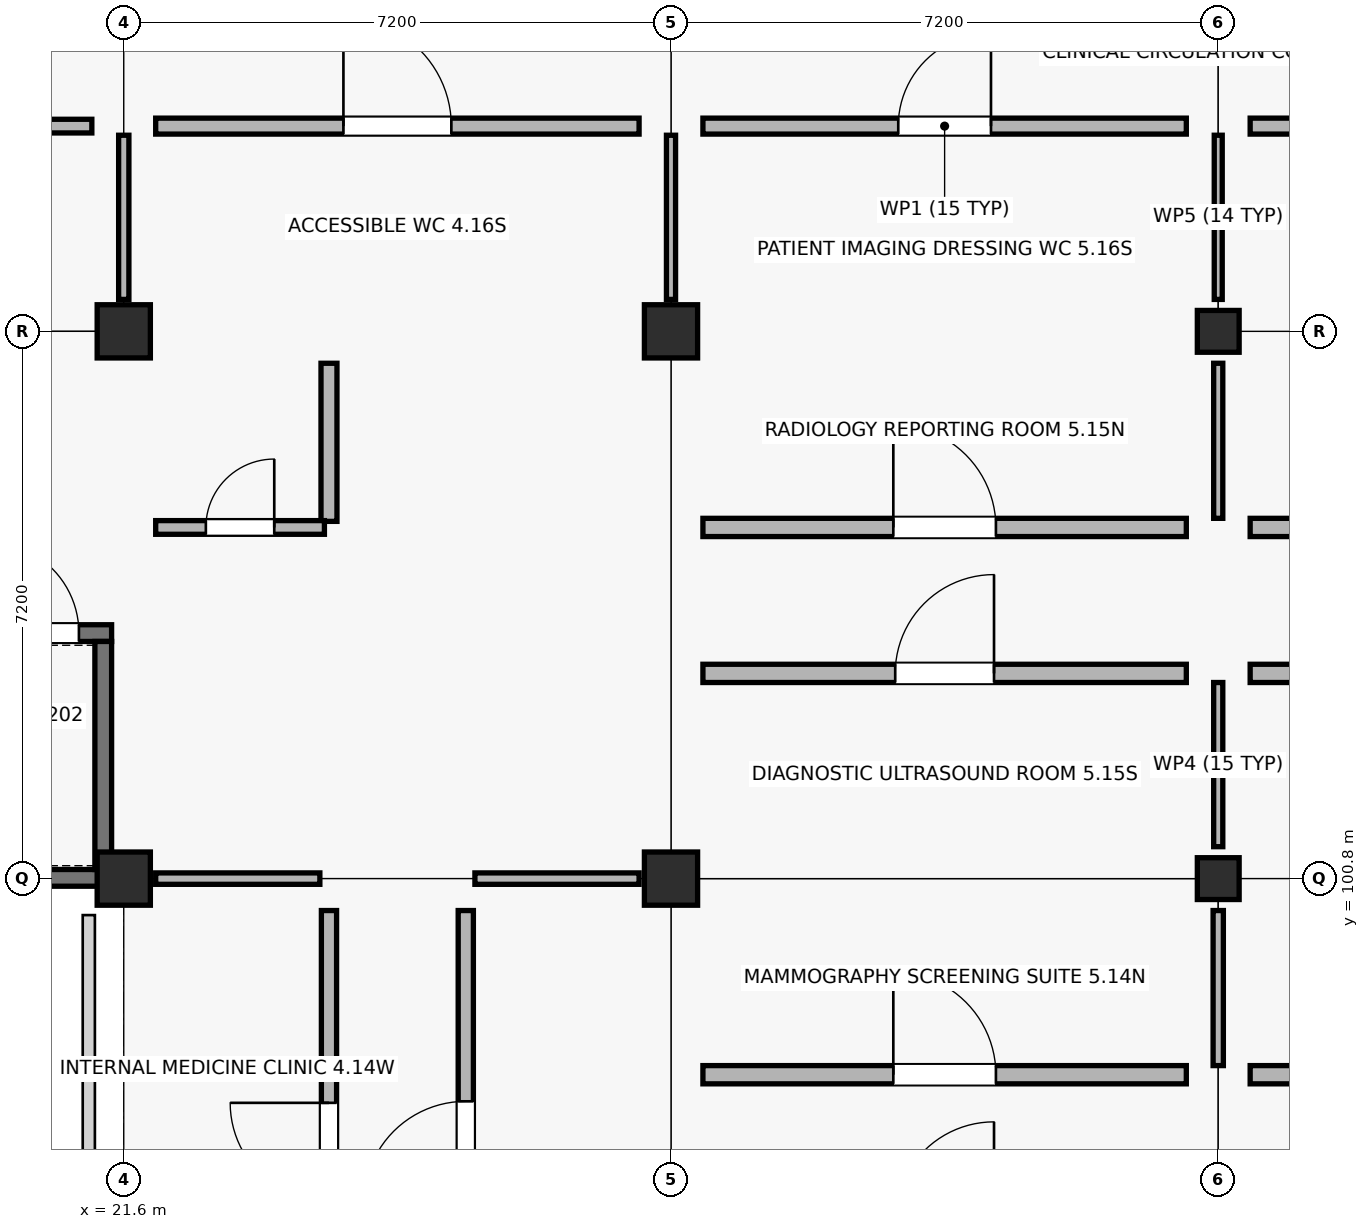
"""IFC4 building model, lengths in metres.
Left out: names, types, materials, properties, quantities, classifications, styles, units other than length and angle.
Written with IfcOpenShell. Run it as: python <this file> out.ifc"""

import sys

from ifc_helpers import new_model, si_unit, direction, frame, frame_2d, origin, origin_2d, place, context, subcontext, project, spatial, rectangle, extrude, element, fill, save


model = new_model("IFC4")
c1 = context("Model", 3, precision=1e-05, world=origin(), true_north=direction((0.0, 1.0)))
c2 = subcontext(c1, "Body", "Model", "MODEL_VIEW")
j1 = project(units=[si_unit("LENGTHUNIT", "METRE"), si_unit("PLANEANGLEUNIT", "RADIAN")], contexts=[c1])
p1 = place(None, origin())
s1 = spatial("IfcSite", under=j1, at=p1, CompositionType="ELEMENT")
p2 = place(p1, origin())
s2 = spatial("IfcBuilding", under=s1, at=p2, CompositionType="ELEMENT")
p3 = place(p2, frame((0.0, 0.0, 4.5)))
s3 = spatial("IfcBuildingStorey", under=s2, at=p3, CompositionType="ELEMENT", Elevation=4.5)
for number, where, z_axis, x_axis in (
    (1, (21.6, 100.8, 0.0), (0.0, 0.0, 1.0), (1.0, 0.0, 0.0)),
    (2, (21.6, 108.0, 0.0), (0.0, 0.0, 1.0), (1.0, 0.0, 0.0)),
    (3, (28.8, 100.8, 0.0), (0.0, 0.0, 1.0), (1.0, 0.0, 0.0)),
    (4, (28.8, 108.0, 0.0), (0.0, 0.0, 1.0), (1.0, 0.0, 0.0)),
):
    element("IfcColumn", number, at=place(p3, frame(where, z_axis=z_axis, x_axis=x_axis)), inside=s3, PredefinedType="COLUMN", context=c2, shape_type="SweptSolid", body=[
        extrude(rectangle(XDim=0.7, YDim=0.7, at=origin_2d()), origin(), (0.0, 0.0, 1.0), 4.5),
    ])
for number, where, z_axis, x_axis in (
    (5, (36.0, 100.8, 0.0), (0.0, 0.0, 1.0), (1.0, 0.0, 0.0)),
    (6, (36.0, 108.0, 0.0), (0.0, 0.0, 1.0), (1.0, 0.0, 0.0)),
):
    element("IfcColumn", number, at=place(p3, frame(where, z_axis=z_axis, x_axis=x_axis)), inside=s3, PredefinedType="COLUMN", context=c2, shape_type="SweptSolid", body=[
        extrude(rectangle(XDim=0.55, YDim=0.55, at=origin_2d()), origin(), (0.0, 0.0, 1.0), 4.5),
    ])
p4 = place(p3, frame((14.56, 100.81, 0.0), z_axis=(0.0, 0.0, 1.0), x_axis=(1.0, 0.0, 0.0)))
e7 = element("IfcWall", 7, at=p4, inside=s3, PredefinedType="SHEAR", context=c2, shape_type="SweptSolid", body=[
    extrude(rectangle(XDim=6.88, YDim=0.22, at=frame_2d((3.44, 0.0))), origin(), (0.0, 0.0, 1.0), 4.22),
])
p5 = place(p3, frame((14.56, 104.03, 0.0), z_axis=(0.0, 0.0, 1.0), x_axis=(1.0, 0.0, 0.0)))
e8 = element("IfcWall", 8, at=p5, inside=s3, PredefinedType="SHEAR", context=c2, shape_type="SweptSolid", body=[
    extrude(rectangle(XDim=6.88, YDim=0.22, at=frame_2d((3.44, 0.0))), origin(), (0.0, 0.0, 1.0), 4.22),
])
p6 = place(p5, frame((5.25, 0.0, 0.0)))
e9 = element("IfcOpeningElement", 9, at=p6, cuts=e8, PredefinedType="OPENING", context=c2, shape_type="SweptSolid", body=[
    extrude(rectangle(XDim=1.2, YDim=2.15, at=frame_2d((0.6, 1.075))), frame((0.0, 0.12, 0.0), z_axis=(0.0, -1.0, 0.0), x_axis=(1.0, 0.0, 0.0)), (0.0, 0.0, 1.0), 0.24),
])
p7 = place(p3, frame((21.33, 100.92, 0.0), z_axis=(0.0, 0.0, 1.0), x_axis=(0.0, 1.0, 0.0)))
e10 = element("IfcWall", 10, at=p7, inside=s3, PredefinedType="SHEAR", context=c2, shape_type="SweptSolid", body=[
    extrude(rectangle(XDim=3.0, YDim=0.22, at=frame_2d((1.5, 0.0))), origin(), (0.0, 0.0, 1.0), 4.22),
])
p8 = place(p3, frame((29.22, 98.22, 0.0), z_axis=(0.0, 0.0, 1.0), x_axis=(1.0, 0.0, 0.0)))
e11 = element("IfcWall", 11, at=p8, inside=s3, PredefinedType="SOLIDWALL", context=c2, shape_type="SweptSolid", body=[
    extrude(rectangle(XDim=6.36, YDim=0.24, at=frame_2d((3.18, 0.0))), origin(), (0.0, 0.0, 1.0), 3.36),
])
p9 = place(p8, frame((2.505, 0.0, 0.0)))
e12 = element("IfcOpeningElement", 12, at=p9, cuts=e11, PredefinedType="OPENING", context=c2, shape_type="SweptSolid", body=[
    extrude(rectangle(XDim=1.35, YDim=2.2, at=frame_2d((0.675, 1.1))), frame((0.0, 0.13, 0.0), z_axis=(0.0, -1.0, 0.0), x_axis=(1.0, 0.0, 0.0)), (0.0, 0.0, 1.0), 0.26),
])
p10 = place(p3, frame((36.0, 98.34, 0.0), z_axis=(0.0, 0.0, 1.0), x_axis=(0.0, 1.0, 0.0)))
e13 = element("IfcWall", 13, at=p10, inside=s3, PredefinedType="PARTITIONING", context=c2, shape_type="SweptSolid", body=[
    extrude(rectangle(XDim=2.04, YDim=0.135, at=frame_2d((1.02, 0.0))), origin(), (0.0, 0.0, 1.0), 3.36),
])
p11 = place(p3, frame((29.22, 103.5, 0.0), z_axis=(0.0, 0.0, 1.0), x_axis=(1.0, 0.0, 0.0)))
e14 = element("IfcWall", 14, at=p11, inside=s3, PredefinedType="SOLIDWALL", context=c2, shape_type="SweptSolid", body=[
    extrude(rectangle(XDim=6.36, YDim=0.24, at=frame_2d((3.18, 0.0))), origin(), (0.0, 0.0, 1.0), 3.36),
])
p12 = place(p11, frame((2.53, 0.0, 0.0)))
e15 = element("IfcOpeningElement", 15, at=p12, cuts=e14, PredefinedType="OPENING", context=c2, shape_type="SweptSolid", body=[
    extrude(rectangle(XDim=1.3, YDim=2.15, at=frame_2d((0.65, 1.075))), frame((0.0, 0.13, 0.0), z_axis=(0.0, -1.0, 0.0), x_axis=(1.0, 0.0, 0.0)), (0.0, 0.0, 1.0), 0.26),
])
p13 = place(p3, frame((36.0, 101.22, 0.0), z_axis=(0.0, 0.0, 1.0), x_axis=(0.0, 1.0, 0.0)))
e16 = element("IfcWall", 16, at=p13, inside=s3, PredefinedType="PARTITIONING", context=c2, shape_type="SweptSolid", body=[
    extrude(rectangle(XDim=2.16, YDim=0.12, at=frame_2d((1.08, 0.0))), origin(), (0.0, 0.0, 1.0), 3.36),
])
p14 = place(p3, frame((29.22, 105.42, 0.0), z_axis=(0.0, 0.0, 1.0), x_axis=(1.0, 0.0, 0.0)))
e17 = element("IfcWall", 17, at=p14, inside=s3, PredefinedType="SOLIDWALL", context=c2, shape_type="SweptSolid", body=[
    extrude(rectangle(XDim=6.36, YDim=0.24, at=frame_2d((3.18, 0.0))), origin(), (0.0, 0.0, 1.0), 3.36),
])
p15 = place(p14, frame((2.505, 0.0, 0.0)))
e18 = element("IfcOpeningElement", 18, at=p15, cuts=e17, PredefinedType="OPENING", context=c2, shape_type="SweptSolid", body=[
    extrude(rectangle(XDim=1.35, YDim=2.2, at=frame_2d((0.675, 1.1))), frame((0.0, 0.13, 0.0), z_axis=(0.0, -1.0, 0.0), x_axis=(1.0, 0.0, 0.0)), (0.0, 0.0, 1.0), 0.26),
])
p16 = place(p3, frame((36.0, 105.54, 0.0), z_axis=(0.0, 0.0, 1.0), x_axis=(0.0, 1.0, 0.0)))
e19 = element("IfcWall", 19, at=p16, inside=s3, PredefinedType="PARTITIONING", context=c2, shape_type="SweptSolid", body=[
    extrude(rectangle(XDim=2.04, YDim=0.12, at=frame_2d((1.02, 0.0))), origin(), (0.0, 0.0, 1.0), 3.36),
])
p17 = place(p3, frame((29.22, 110.7, 0.0), z_axis=(0.0, 0.0, 1.0), x_axis=(1.0, 0.0, 0.0)))
e20 = element("IfcWall", 20, at=p17, inside=s3, PredefinedType="PLUMBINGWALL", context=c2, shape_type="SweptSolid", body=[
    extrude(rectangle(XDim=6.36, YDim=0.21, at=frame_2d((3.18, 0.0))), origin(), (0.0, 0.0, 1.0), 3.36),
])
p18 = place(p17, frame((2.57, 0.0, 0.0)))
e21 = element("IfcOpeningElement", 21, at=p18, cuts=e20, PredefinedType="OPENING", context=c2, shape_type="SweptSolid", body=[
    extrude(rectangle(XDim=1.22, YDim=2.19, at=frame_2d((0.61, 1.095))), frame((0.0, 0.115, 0.0), z_axis=(0.0, -1.0, 0.0), x_axis=(1.0, 0.0, 0.0)), (0.0, 0.0, 1.0), 0.23),
])
p19 = place(p3, frame((36.0, 108.42, 0.0), z_axis=(0.0, 0.0, 1.0), x_axis=(0.0, 1.0, 0.0)))
e22 = element("IfcWall", 22, at=p19, inside=s3, PredefinedType="PARTITIONING", context=c2, shape_type="SweptSolid", body=[
    extrude(rectangle(XDim=2.16, YDim=0.105, at=frame_2d((1.08, 0.0))), origin(), (0.0, 0.0, 1.0), 3.36),
])
p20 = place(p3, frame((36.42, 98.22, 0.0), z_axis=(0.0, 0.0, 1.0), x_axis=(1.0, 0.0, 0.0)))
e23 = element("IfcWall", 23, at=p20, inside=s3, PredefinedType="SOLIDWALL", context=c2, shape_type="SweptSolid", body=[
    extrude(rectangle(XDim=6.36, YDim=0.24, at=frame_2d((3.18, 0.0))), origin(), (0.0, 0.0, 1.0), 3.36),
])
p21 = place(p20, frame((2.505, 0.0, 0.0)))
e24 = element("IfcOpeningElement", 24, at=p21, cuts=e23, PredefinedType="OPENING", context=c2, shape_type="SweptSolid", body=[
    extrude(rectangle(XDim=1.35, YDim=2.2, at=frame_2d((0.675, 1.1))), frame((0.0, 0.13, 0.0), z_axis=(0.0, -1.0, 0.0), x_axis=(1.0, 0.0, 0.0)), (0.0, 0.0, 1.0), 0.26),
])
p22 = place(p3, frame((36.42, 103.5, 0.0), z_axis=(0.0, 0.0, 1.0), x_axis=(1.0, 0.0, 0.0)))
e25 = element("IfcWall", 25, at=p22, inside=s3, PredefinedType="SOLIDWALL", context=c2, shape_type="SweptSolid", body=[
    extrude(rectangle(XDim=6.36, YDim=0.24, at=frame_2d((3.18, 0.0))), origin(), (0.0, 0.0, 1.0), 3.36),
])
p23 = place(p22, frame((2.53, 0.0, 0.0)))
e26 = element("IfcOpeningElement", 26, at=p23, cuts=e25, PredefinedType="OPENING", context=c2, shape_type="SweptSolid", body=[
    extrude(rectangle(XDim=1.3, YDim=2.15, at=frame_2d((0.65, 1.075))), frame((0.0, 0.13, 0.0), z_axis=(0.0, -1.0, 0.0), x_axis=(1.0, 0.0, 0.0)), (0.0, 0.0, 1.0), 0.26),
])
p24 = place(p3, frame((36.42, 105.42, 0.0), z_axis=(0.0, 0.0, 1.0), x_axis=(1.0, 0.0, 0.0)))
e27 = element("IfcWall", 27, at=p24, inside=s3, PredefinedType="SOLIDWALL", context=c2, shape_type="SweptSolid", body=[
    extrude(rectangle(XDim=6.36, YDim=0.24, at=frame_2d((3.18, 0.0))), origin(), (0.0, 0.0, 1.0), 3.36),
])
p25 = place(p24, frame((2.505, 0.0, 0.0)))
e28 = element("IfcOpeningElement", 28, at=p25, cuts=e27, PredefinedType="OPENING", context=c2, shape_type="SweptSolid", body=[
    extrude(rectangle(XDim=1.35, YDim=2.2, at=frame_2d((0.675, 1.1))), frame((0.0, 0.13, 0.0), z_axis=(0.0, -1.0, 0.0), x_axis=(1.0, 0.0, 0.0)), (0.0, 0.0, 1.0), 0.26),
])
p26 = place(p3, frame((36.42, 110.7, 0.0), z_axis=(0.0, 0.0, 1.0), x_axis=(1.0, 0.0, 0.0)))
e29 = element("IfcWall", 29, at=p26, inside=s3, PredefinedType="PLUMBINGWALL", context=c2, shape_type="SweptSolid", body=[
    extrude(rectangle(XDim=6.36, YDim=0.21, at=frame_2d((3.18, 0.0))), origin(), (0.0, 0.0, 1.0), 3.36),
])
p27 = place(p26, frame((2.555, 0.0, 0.0)))
e30 = element("IfcOpeningElement", 30, at=p27, cuts=e29, PredefinedType="OPENING", context=c2, shape_type="SweptSolid", body=[
    extrude(rectangle(XDim=1.25, YDim=2.15, at=frame_2d((0.625, 1.075))), frame((0.0, 0.115, 0.0), z_axis=(0.0, -1.0, 0.0), x_axis=(1.0, 0.0, 0.0)), (0.0, 0.0, 1.0), 0.23),
])
p28 = place(p3, frame((14.82, 110.7, 0.0), z_axis=(0.0, 0.0, 1.0), x_axis=(1.0, 0.0, 0.0)))
e31 = element("IfcWall", 31, at=p28, inside=s3, PredefinedType="PARTITIONING", context=c2, shape_type="SweptSolid", body=[
    extrude(rectangle(XDim=6.36, YDim=0.18, at=frame_2d((3.18, 0.0))), origin(), (0.0, 0.0, 1.0), 3.36),
])
p29 = place(p28, frame((2.48, 0.0, 0.0)))
e32 = element("IfcOpeningElement", 32, at=p29, cuts=e31, PredefinedType="OPENING", context=c2, shape_type="SweptSolid", body=[
    extrude(rectangle(XDim=1.4, YDim=2.2, at=frame_2d((0.7, 1.1))), frame((0.0, 0.1, 0.0), z_axis=(0.0, -1.0, 0.0), x_axis=(1.0, 0.0, 0.0)), (0.0, 0.0, 1.0), 0.2),
])
p30 = place(p3, frame((21.6, 108.42, 0.0), z_axis=(0.0, 0.0, 1.0), x_axis=(0.0, 1.0, 0.0)))
e33 = element("IfcWall", 33, at=p30, inside=s3, PredefinedType="PARTITIONING", context=c2, shape_type="SweptSolid", body=[
    extrude(rectangle(XDim=2.16, YDim=0.135, at=frame_2d((1.08, 0.0))), origin(), (0.0, 0.0, 1.0), 3.36),
])
p31 = place(p3, frame((24.3, 94.02, 0.0), z_axis=(0.0, 0.0, 1.0), x_axis=(0.0, 1.0, 0.0)))
e34 = element("IfcWall", 34, at=p31, inside=s3, PredefinedType="SOLIDWALL", context=c2, shape_type="SweptSolid", body=[
    extrude(rectangle(XDim=6.36, YDim=0.2, at=frame_2d((3.18, 0.0))), origin(), (0.0, 0.0, 1.0), 3.36),
])
p32 = place(p31, frame((2.53, 0.0, 0.0)))
e35 = element("IfcOpeningElement", 35, at=p32, cuts=e34, PredefinedType="OPENING", context=c2, shape_type="SweptSolid", body=[
    extrude(rectangle(XDim=1.3, YDim=2.04, at=frame_2d((0.65, 1.02))), frame((0.0, 0.11, 0.0), z_axis=(0.0, -1.0, 0.0), x_axis=(1.0, 0.0, 0.0)), (0.0, 0.0, 1.0), 0.22),
])
p33 = place(p3, frame((22.02, 100.8, 0.0), z_axis=(0.0, 0.0, 1.0), x_axis=(1.0, 0.0, 0.0)))
e36 = element("IfcWall", 36, at=p33, inside=s3, PredefinedType="PARTITIONING", context=c2, shape_type="SweptSolid", body=[
    extrude(rectangle(XDim=2.16, YDim=0.15, at=frame_2d((1.08, 0.0))), origin(), (0.0, 0.0, 1.0), 3.36),
])
p34 = place(p3, frame((26.1, 94.02, 0.0), z_axis=(0.0, 0.0, 1.0), x_axis=(0.0, 1.0, 0.0)))
e37 = element("IfcWall", 37, at=p34, inside=s3, PredefinedType="SOLIDWALL", context=c2, shape_type="SweptSolid", body=[
    extrude(rectangle(XDim=6.36, YDim=0.2, at=frame_2d((3.18, 0.0))), origin(), (0.0, 0.0, 1.0), 3.36),
])
p35 = place(p34, frame((2.51, 0.0, 0.0)))
e38 = element("IfcOpeningElement", 38, at=p35, cuts=e37, PredefinedType="OPENING", context=c2, shape_type="SweptSolid", body=[
    extrude(rectangle(XDim=1.34, YDim=2.04, at=frame_2d((0.67, 1.02))), frame((0.0, 0.11, 0.0), z_axis=(0.0, -1.0, 0.0), x_axis=(1.0, 0.0, 0.0)), (0.0, 0.0, 1.0), 0.22),
])
p36 = place(p3, frame((26.22, 100.8, 0.0), z_axis=(0.0, 0.0, 1.0), x_axis=(1.0, 0.0, 0.0)))
e39 = element("IfcWall", 39, at=p36, inside=s3, PredefinedType="PARTITIONING", context=c2, shape_type="SweptSolid", body=[
    extrude(rectangle(XDim=2.16, YDim=0.15, at=frame_2d((1.08, 0.0))), origin(), (0.0, 0.0, 1.0), 3.36),
])
p37 = place(p3, frame((24.3, 105.5, 0.0), z_axis=(0.0, 0.0, 1.0), x_axis=(0.0, 1.0, 0.0)))
e40 = element("IfcWall", 40, at=p37, inside=s3, PredefinedType="PLUMBINGWALL", context=c2, shape_type="SweptSolid", body=[
    extrude(rectangle(XDim=2.08, YDim=0.21, at=frame_2d((1.04, 0.0))), origin(), (0.0, 0.0, 1.0), 3.36),
])
p38 = place(p3, frame((22.02, 105.42, 0.0), z_axis=(0.0, 0.0, 1.0), x_axis=(1.0, 0.0, 0.0)))
e41 = element("IfcWall", 41, at=p38, inside=s3, PredefinedType="PARTITIONING", context=c2, shape_type="SweptSolid", body=[
    extrude(rectangle(XDim=2.22, YDim=0.18, at=frame_2d((1.11, 0.0))), origin(), (0.0, 0.0, 1.0), 3.36),
])
p39 = place(p38, frame((0.66, 0.0, 0.0)))
e42 = element("IfcOpeningElement", 42, at=p39, cuts=e41, PredefinedType="OPENING", context=c2, shape_type="SweptSolid", body=[
    extrude(rectangle(XDim=0.9, YDim=2.04, at=frame_2d((0.45, 1.02))), frame((0.0, 0.1, 0.0), z_axis=(0.0, -1.0, 0.0), x_axis=(1.0, 0.0, 0.0)), (0.0, 0.0, 1.0), 0.2),
])
p40 = place(p3, frame((22.02, 110.7, 0.0), z_axis=(0.0, 0.0, 1.0), x_axis=(1.0, 0.0, 0.0)))
e43 = element("IfcWall", 43, at=p40, inside=s3, PredefinedType="PLUMBINGWALL", context=c2, shape_type="SweptSolid", body=[
    extrude(rectangle(XDim=6.36, YDim=0.21, at=frame_2d((3.18, 0.0))), origin(), (0.0, 0.0, 1.0), 3.36),
])
p41 = place(p40, frame((2.47, 0.0, 0.0)))
e44 = element("IfcOpeningElement", 44, at=p41, cuts=e43, PredefinedType="OPENING", context=c2, shape_type="SweptSolid", body=[
    extrude(rectangle(XDim=1.42, YDim=2.04, at=frame_2d((0.71, 1.02))), frame((0.0, 0.115, 0.0), z_axis=(0.0, -1.0, 0.0), x_axis=(1.0, 0.0, 0.0)), (0.0, 0.0, 1.0), 0.23),
])
p42 = place(p3, frame((28.8, 108.42, 0.0), z_axis=(0.0, 0.0, 1.0), x_axis=(0.0, 1.0, 0.0)))
e45 = element("IfcWall", 45, at=p42, inside=s3, PredefinedType="PARTITIONING", context=c2, shape_type="SweptSolid", body=[
    extrude(rectangle(XDim=2.16, YDim=0.12, at=frame_2d((1.08, 0.0))), origin(), (0.0, 0.0, 1.0), 3.36),
])
p43 = place(p6, origin())
e46 = element("IfcDoor", 46, at=p43, inside=s3, OperationType="SINGLE_SWING_LEFT", PredefinedType="DOOR", context=c2, shape_type="SweptSolid", body=[
    extrude(rectangle(XDim=1.2, YDim=2.15, at=frame_2d((0.6, 1.075))), frame((0.0, 0.025, 0.0), z_axis=(0.0, -1.0, 0.0), x_axis=(1.0, 0.0, 0.0)), (0.0, 0.0, 1.0), 0.05),
])
fill(e9, e46)
p44 = place(p9, origin())
e47 = element("IfcDoor", 47, at=p44, inside=s3, OperationType="SINGLE_SWING_LEFT", PredefinedType="DOOR", context=c2, shape_type="SweptSolid", body=[
    extrude(rectangle(XDim=1.35, YDim=2.2, at=frame_2d((0.675, 1.1))), frame((0.0, 0.025, 0.0), z_axis=(0.0, -1.0, 0.0), x_axis=(1.0, 0.0, 0.0)), (0.0, 0.0, 1.0), 0.05),
])
fill(e12, e47)
p45 = place(p12, origin())
e48 = element("IfcDoor", 48, at=p45, inside=s3, OperationType="SINGLE_SWING_RIGHT", PredefinedType="DOOR", context=c2, shape_type="SweptSolid", body=[
    extrude(rectangle(XDim=1.3, YDim=2.15, at=frame_2d((0.65, 1.075))), frame((0.0, 0.025, 0.0), z_axis=(0.0, -1.0, 0.0), x_axis=(1.0, 0.0, 0.0)), (0.0, 0.0, 1.0), 0.05),
])
fill(e15, e48)
p46 = place(p15, origin())
e49 = element("IfcDoor", 49, at=p46, inside=s3, OperationType="SINGLE_SWING_LEFT", PredefinedType="DOOR", context=c2, shape_type="SweptSolid", body=[
    extrude(rectangle(XDim=1.35, YDim=2.2, at=frame_2d((0.675, 1.1))), frame((0.0, 0.025, 0.0), z_axis=(0.0, -1.0, 0.0), x_axis=(1.0, 0.0, 0.0)), (0.0, 0.0, 1.0), 0.05),
])
fill(e18, e49)
p47 = place(p18, origin())
e50 = element("IfcDoor", 50, at=p47, inside=s3, OperationType="SINGLE_SWING_RIGHT", PredefinedType="DOOR", context=c2, shape_type="SweptSolid", body=[
    extrude(rectangle(XDim=1.22, YDim=2.19, at=frame_2d((0.61, 1.095))), frame((0.0, 0.025, 0.0), z_axis=(0.0, -1.0, 0.0), x_axis=(1.0, 0.0, 0.0)), (0.0, 0.0, 1.0), 0.05),
])
fill(e21, e50)
p48 = place(p32, origin())
e51 = element("IfcDoor", 51, at=p48, inside=s3, OperationType="SINGLE_SWING_RIGHT", PredefinedType="DOOR", context=c2, shape_type="SweptSolid", body=[
    extrude(rectangle(XDim=1.3, YDim=2.04, at=frame_2d((0.65, 1.02))), frame((0.0, 0.025, 0.0), z_axis=(0.0, -1.0, 0.0), x_axis=(1.0, 0.0, 0.0)), (0.0, 0.0, 1.0), 0.05),
])
fill(e35, e51)
p49 = place(p35, origin())
e52 = element("IfcDoor", 52, at=p49, inside=s3, OperationType="SINGLE_SWING_LEFT", PredefinedType="DOOR", context=c2, shape_type="SweptSolid", body=[
    extrude(rectangle(XDim=1.34, YDim=2.04, at=frame_2d((0.67, 1.02))), frame((0.0, 0.025, 0.0), z_axis=(0.0, -1.0, 0.0), x_axis=(1.0, 0.0, 0.0)), (0.0, 0.0, 1.0), 0.05),
])
fill(e38, e52)
p50 = place(p39, origin())
e53 = element("IfcDoor", 53, at=p50, inside=s3, OperationType="SINGLE_SWING_RIGHT", PredefinedType="DOOR", context=c2, shape_type="SweptSolid", body=[
    extrude(rectangle(XDim=0.9, YDim=2.04, at=frame_2d((0.45, 1.02))), frame((0.0, 0.025, 0.0), z_axis=(0.0, -1.0, 0.0), x_axis=(1.0, 0.0, 0.0)), (0.0, 0.0, 1.0), 0.05),
])
fill(e42, e53)
p51 = place(p41, origin())
e54 = element("IfcDoor", 54, at=p51, inside=s3, OperationType="SINGLE_SWING_LEFT", PredefinedType="DOOR", context=c2, shape_type="SweptSolid", body=[
    extrude(rectangle(XDim=1.42, YDim=2.04, at=frame_2d((0.71, 1.02))), frame((0.0, 0.025, 0.0), z_axis=(0.0, -1.0, 0.0), x_axis=(1.0, 0.0, 0.0)), (0.0, 0.0, 1.0), 0.05),
])
fill(e44, e54)
save(model, sys.argv[1])
